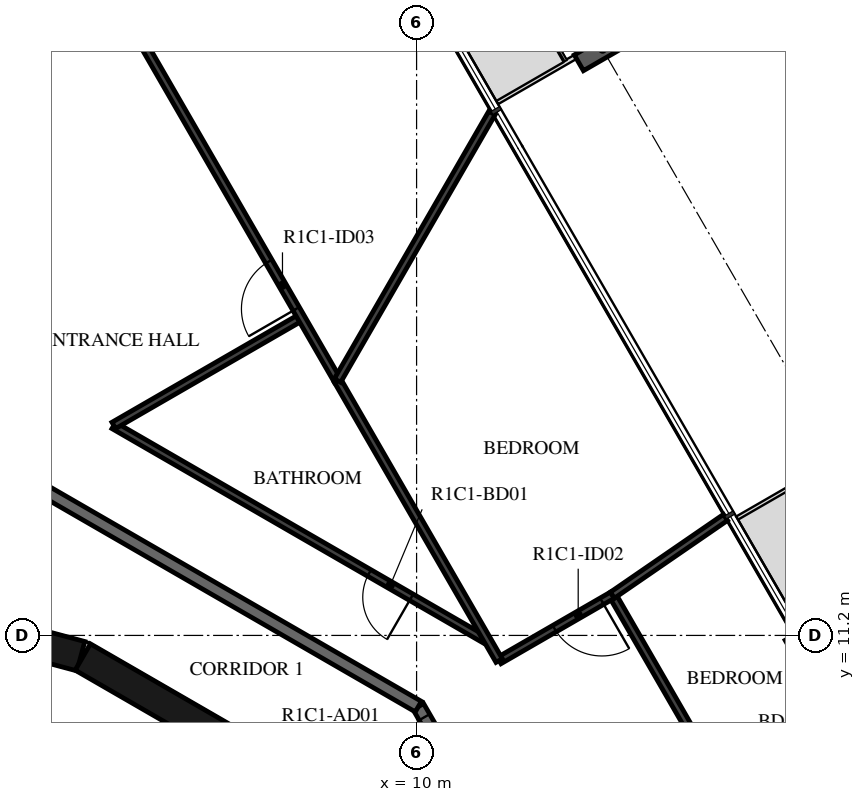
"""IFC4 building model, lengths in metres.
Left out: names, types, materials, properties, quantities, classifications, styles, units other than length and angle.
Written with IfcOpenShell. Run it as: python <this file> out.ifc"""

import sys

from ifc_helpers import new_model, si_unit, direction, frame, frame_2d, origin, origin_2d, place, context, subcontext, project, spatial, rectangle, i_section, extrude, element, fill, save


model = new_model("IFC4")
c1 = context("Model", 3, precision=1e-05, world=origin(), true_north=direction((0.0, 1.0)))
c2 = subcontext(c1, "Body", "Model", "MODEL_VIEW")
j1 = project(units=[si_unit("LENGTHUNIT", "METRE"), si_unit("PLANEANGLEUNIT", "RADIAN")], contexts=[c1])
p1 = place(None, origin())
s1 = spatial("IfcSite", under=j1, at=p1, CompositionType="ELEMENT")
p2 = place(p1, origin())
s2 = spatial("IfcBuilding", under=s1, at=p2, CompositionType="ELEMENT")
p3 = place(p2, frame((0.0, 0.0, 62.9)))
s3 = spatial("IfcBuildingStorey", under=s2, at=p3, CompositionType="ELEMENT", Elevation=62.9)
p4 = place(p3, frame((13.059, 20.842, -0.38), z_axis=(0.0, 0.0, 1.0), x_axis=(0.50000017485, -0.866025302835, 0.0)))
e1 = element("IfcColumn", 1, at=p4, inside=s3, PredefinedType="COLUMN", context=c2, shape_type="SweptSolid", body=[
    extrude(i_section(OverallWidth=0.3, OverallDepth=0.9, WebThickness=0.019, FlangeThickness=0.035, FilletRadius=0.03, at=origin_2d()), origin(), (0.0, 0.0, 1.0), 3.5),
])
p5 = place(p3, frame((17.731, 8.389, 0.0), z_axis=(0.0, 0.0, 1.0), x_axis=(-0.500028443584, 0.866008981251, 0.0)))
e2 = element("IfcWall", 2, at=p5, inside=s3, PredefinedType="STANDARD", context=c2, shape_type="SweptSolid", body=[
    extrude(rectangle(XDim=3.2, YDim=0.16, at=frame_2d((1.6, 0.0))), origin(), (0.0, 0.0, 1.0), 3.12),
])
p6 = place(p5, frame((0.4, 0.0, 0.0)))
e3 = element("IfcOpeningElement", 3, at=p6, cuts=e2, PredefinedType="OPENING", context=c2, shape_type="SweptSolid", body=[
    extrude(rectangle(XDim=2.4, YDim=2.4, at=frame_2d((1.2, 1.2))), frame((0.0, 0.09, 0.0), z_axis=(0.0, -1.0, 0.0), x_axis=(1.0, 0.0, 0.0)), (0.0, 0.0, 1.0), 0.18),
])
p7 = place(p3, frame((7.137, 9.329, 0.0), z_axis=(0.0, 0.0, 1.0), x_axis=(-0.865975092491, 0.500087131594, 0.0)))
e4 = element("IfcWall", 4, at=p7, inside=s3, PredefinedType="SHEAR", context=c2, shape_type="SweptSolid", body=[
    extrude(rectangle(XDim=3.033, YDim=0.5, at=frame_2d((1.516, 0.0))), origin(), (0.0, 0.0, 1.0), 3.12),
])
p8 = place(p3, frame((4.479, 10.858, 0.0), z_axis=(0.0, 0.0, 1.0), x_axis=(-0.965948410781, 0.258734743916, 0.0)))
e5 = element("IfcWall", 5, at=p8, inside=s3, PredefinedType="SHEAR", context=c2, shape_type="SweptSolid", body=[
    extrude(rectangle(XDim=3.033, YDim=0.5, at=frame_2d((1.516, 0.0))), origin(), (0.0, 0.0, 1.0), 3.12),
])
p9 = place(p8, frame((1.066, 0.0, 0.0)))
e6 = element("IfcOpeningElement", 6, at=p9, cuts=e5, PredefinedType="OPENING", context=c2, shape_type="SweptSolid", body=[
    extrude(rectangle(XDim=0.9, YDim=2.1, at=frame_2d((0.45, 1.05))), frame((0.0, 0.26, 0.0), z_axis=(0.0, -1.0, 0.0), x_axis=(1.0, 0.0, 0.0)), (0.0, 0.0, 1.0), 0.52),
])
p10 = place(p3, frame((13.7, 3.671, 0.0), z_axis=(0.0, 0.0, 1.0), x_axis=(-0.500001669485, 0.866024439905, 0.0)))
e7 = element("IfcWall", 7, at=p10, inside=s3, PredefinedType="STANDARD", context=c2, shape_type="SweptSolid", body=[
    extrude(rectangle(XDim=7.342, YDim=0.2, at=frame_2d((3.671, 0.0))), origin(), (0.0, 0.0, 1.0), 3.12),
])
p11 = place(p10, frame((6.142, 0.0, 0.0)))
e8 = element("IfcOpeningElement", 8, at=p11, cuts=e7, PredefinedType="OPENING", context=c2, shape_type="SweptSolid", body=[
    extrude(rectangle(XDim=1.0, YDim=2.1, at=frame_2d((0.5, 1.05))), frame((0.0, 0.11, 0.0), z_axis=(0.0, -1.0, 0.0), x_axis=(1.0, 0.0, 0.0)), (0.0, 0.0, 1.0), 0.22),
])
p12 = place(p3, frame((10.029, 10.029, 0.0), z_axis=(0.0, 0.0, 1.0), x_axis=(-0.866024439905, 0.500001669485, 0.0)))
e9 = element("IfcWall", 9, at=p12, inside=s3, PredefinedType="STANDARD", context=c2, shape_type="SweptSolid", body=[
    extrude(rectangle(XDim=7.342, YDim=0.2, at=frame_2d((3.671, 0.0))), origin(), (0.0, 0.0, 1.0), 3.12),
])
p13 = place(p3, frame((14.471, 9.697, 0.0), z_axis=(0.0, 0.0, 1.0), x_axis=(-0.500004234368, 0.866022959057, 0.0)))
e10 = element("IfcWall", 10, at=p13, inside=s3, PredefinedType="PARTITIONING", context=c2, shape_type="SweptSolid", body=[
    extrude(rectangle(XDim=2.5, YDim=0.12, at=frame_2d((1.25, 0.0))), origin(), (0.0, 0.0, 1.0), 3.12),
])
p14 = place(p3, frame((13.221, 11.862, 0.0), z_axis=(0.0, 0.0, 1.0), x_axis=(-0.866055151781, -0.499948471418, 0.0)))
e11 = element("IfcWall", 11, at=p14, inside=s3, PredefinedType="PARTITIONING", context=c2, shape_type="SweptSolid", body=[
    extrude(rectangle(XDim=2.151, YDim=0.12, at=frame_2d((1.075, 0.0))), origin(), (0.0, 0.0, 1.0), 3.12),
])
p15 = place(p14, frame((0.2, 0.0, 0.0)))
e12 = element("IfcOpeningElement", 12, at=p15, cuts=e11, PredefinedType="OPENING", context=c2, shape_type="SweptSolid", body=[
    extrude(rectangle(XDim=0.9, YDim=2.1, at=frame_2d((0.45, 1.05))), frame((0.0, 0.07, 0.0), z_axis=(0.0, -1.0, 0.0), x_axis=(1.0, 0.0, 0.0)), (0.0, 0.0, 1.0), 0.14),
])
p16 = place(p3, frame((11.127, 11.127, 0.0), z_axis=(0.0, 0.0, 1.0), x_axis=(-0.86602299963, 0.500004164094, 0.0)))
e13 = element("IfcWall", 13, at=p16, inside=s3, PredefinedType="PARTITIONING", context=c2, shape_type="SweptSolid", body=[
    extrude(rectangle(XDim=7.052, YDim=0.12, at=frame_2d((3.526, 0.0))), origin(), (0.0, 0.0, 1.0), 3.12),
])
p17 = place(p16, frame((1.4, 0.0, 0.0)))
e14 = element("IfcOpeningElement", 14, at=p17, cuts=e13, PredefinedType="OPENING", context=c2, shape_type="SweptSolid", body=[
    extrude(rectangle(XDim=0.8, YDim=2.1, at=frame_2d((0.4, 1.05))), frame((0.0, 0.07, 0.0), z_axis=(0.0, -1.0, 0.0), x_axis=(1.0, 0.0, 0.0)), (0.0, 0.0, 1.0), 0.14),
])
p18 = place(p3, frame((5.02, 14.653, 0.0), z_axis=(0.0, 0.0, 1.0), x_axis=(0.866028940167, 0.499993874756, 0.0)))
e15 = element("IfcWall", 15, at=p18, inside=s3, PredefinedType="PARTITIONING", context=c2, shape_type="SweptSolid", body=[
    extrude(rectangle(XDim=3.556, YDim=0.12, at=frame_2d((1.778, 0.0))), origin(), (0.0, 0.0, 1.0), 3.12),
])
p19 = place(p3, frame((8.7, 15.392, 0.0), z_axis=(0.0, 0.0, 1.0), x_axis=(-0.500002742713, 0.866023820272, 0.0)))
e16 = element("IfcWall", 16, at=p19, inside=s3, PredefinedType="PARTITIONING", context=c2, shape_type="SweptSolid", body=[
    extrude(rectangle(XDim=10.908, YDim=0.12, at=frame_2d((5.454, 0.0))), origin(), (0.0, 0.0, 1.0), 3.12),
])
p20 = place(p19, frame((1.36, 0.0, 0.0)))
e17 = element("IfcOpeningElement", 17, at=p20, cuts=e16, PredefinedType="OPENING", context=c2, shape_type="SweptSolid", body=[
    extrude(rectangle(XDim=0.9, YDim=2.1, at=frame_2d((0.45, 1.05))), frame((0.0, 0.07, 0.0), z_axis=(0.0, -1.0, 0.0), x_axis=(1.0, 0.0, 0.0)), (0.0, 0.0, 1.0), 0.14),
])
p21 = place(p19, frame((8.317, 0.0, 0.0)))
e18 = element("IfcOpeningElement", 18, at=p21, cuts=e16, PredefinedType="OPENING", context=c2, shape_type="SweptSolid", body=[
    extrude(rectangle(XDim=0.9, YDim=2.1, at=frame_2d((0.45, 1.05))), frame((0.0, 0.07, 0.0), z_axis=(0.0, -1.0, 0.0), x_axis=(1.0, 0.0, 0.0)), (0.0, 0.0, 1.0), 0.14),
])
p22 = place(p3, frame((4.841, 22.075, 0.0), z_axis=(0.0, 0.0, 1.0), x_axis=(-0.866019751484, -0.500009789943, 0.0)))
e19 = element("IfcWall", 19, at=p22, inside=s3, PredefinedType="PARTITIONING", context=c2, shape_type="SweptSolid", body=[
    extrude(rectangle(XDim=5.59, YDim=0.12, at=frame_2d((2.795, 0.0))), origin(), (0.0, 0.0, 1.0), 3.12),
])
p23 = place(p22, frame((0.2, 0.0, 0.0)))
e20 = element("IfcOpeningElement", 20, at=p23, cuts=e19, PredefinedType="OPENING", context=c2, shape_type="SweptSolid", body=[
    extrude(rectangle(XDim=0.9, YDim=2.1, at=frame_2d((0.45, 1.05))), frame((0.0, 0.07, 0.0), z_axis=(0.0, -1.0, 0.0), x_axis=(1.0, 0.0, 0.0)), (0.0, 0.0, 1.0), 0.14),
])
p24 = place(p3, frame((15.08, 13.14, 0.0), z_axis=(0.0, 0.0, 1.0), x_axis=(-0.824041924199, -0.566528822887, 0.0)))
e21 = element("IfcWall", 21, at=p24, inside=s3, PredefinedType="PARTITIONING", context=c2, shape_type="SweptSolid", body=[
    extrude(rectangle(XDim=2.256, YDim=0.12, at=frame_2d((1.128, 0.0))), origin(), (0.0, 0.0, 1.0), 2.73),
])
p25 = place(p3, frame((8.7, 15.392, 0.0), z_axis=(0.0, 0.0, 1.0), x_axis=(0.499986106925, -0.866033424806, 0.0)))
e22 = element("IfcWall", 22, at=p25, inside=s3, PredefinedType="PARTITIONING", context=c2, shape_type="SweptSolid", body=[
    extrude(rectangle(XDim=5.317, YDim=0.12, at=frame_2d((2.659, 0.0))), origin(), (0.0, 0.0, 1.0), 3.12),
])
p26 = place(p3, frame((11.24, 19.792, 0.0), z_axis=(0.0, 0.0, 1.0), x_axis=(-0.499978956711, -0.866037552792, 0.0)))
e23 = element("IfcWall", 23, at=p26, inside=s3, PredefinedType="PARTITIONING", context=c2, shape_type="SweptSolid", body=[
    extrude(rectangle(XDim=5.081, YDim=0.12, at=frame_2d((2.541, 0.0))), origin(), (0.0, 0.0, 1.0), 3.12),
])
p27 = place(p11, origin())
e24 = element("IfcDoor", 24, at=p27, inside=s3, OperationType="SINGLE_SWING_RIGHT", PredefinedType="DOOR", context=c2, shape_type="SweptSolid", body=[
    extrude(rectangle(XDim=1.0, YDim=2.1, at=frame_2d((0.5, 1.05))), frame((0.0, 0.025, 0.0), z_axis=(0.0, -1.0, 0.0), x_axis=(1.0, 0.0, 0.0)), (0.0, 0.0, 1.0), 0.05),
])
fill(e8, e24)
p28 = place(p15, origin())
e25 = element("IfcDoor", 25, at=p28, inside=s3, OperationType="SINGLE_SWING_RIGHT", PredefinedType="DOOR", context=c2, shape_type="SweptSolid", body=[
    extrude(rectangle(XDim=0.9, YDim=2.1, at=frame_2d((0.45, 1.05))), frame((0.0, 0.025, 0.0), z_axis=(0.0, -1.0, 0.0), x_axis=(1.0, 0.0, 0.0)), (0.0, 0.0, 1.0), 0.05),
])
fill(e12, e25)
p29 = place(p17, origin())
e26 = element("IfcDoor", 26, at=p29, inside=s3, OperationType="SINGLE_SWING_RIGHT", PredefinedType="DOOR", context=c2, shape_type="SweptSolid", body=[
    extrude(rectangle(XDim=0.8, YDim=2.1, at=frame_2d((0.4, 1.05))), frame((0.0, 0.025, 0.0), z_axis=(0.0, -1.0, 0.0), x_axis=(1.0, 0.0, 0.0)), (0.0, 0.0, 1.0), 0.05),
])
fill(e14, e26)
p30 = place(p20, origin())
e27 = element("IfcDoor", 27, at=p30, inside=s3, OperationType="SINGLE_SWING_RIGHT", PredefinedType="DOOR", context=c2, shape_type="SweptSolid", body=[
    extrude(rectangle(XDim=0.9, YDim=2.1, at=frame_2d((0.45, 1.05))), frame((0.0, 0.025, 0.0), z_axis=(0.0, -1.0, 0.0), x_axis=(1.0, 0.0, 0.0)), (0.0, 0.0, 1.0), 0.05),
])
fill(e17, e27)
save(model, sys.argv[1])
